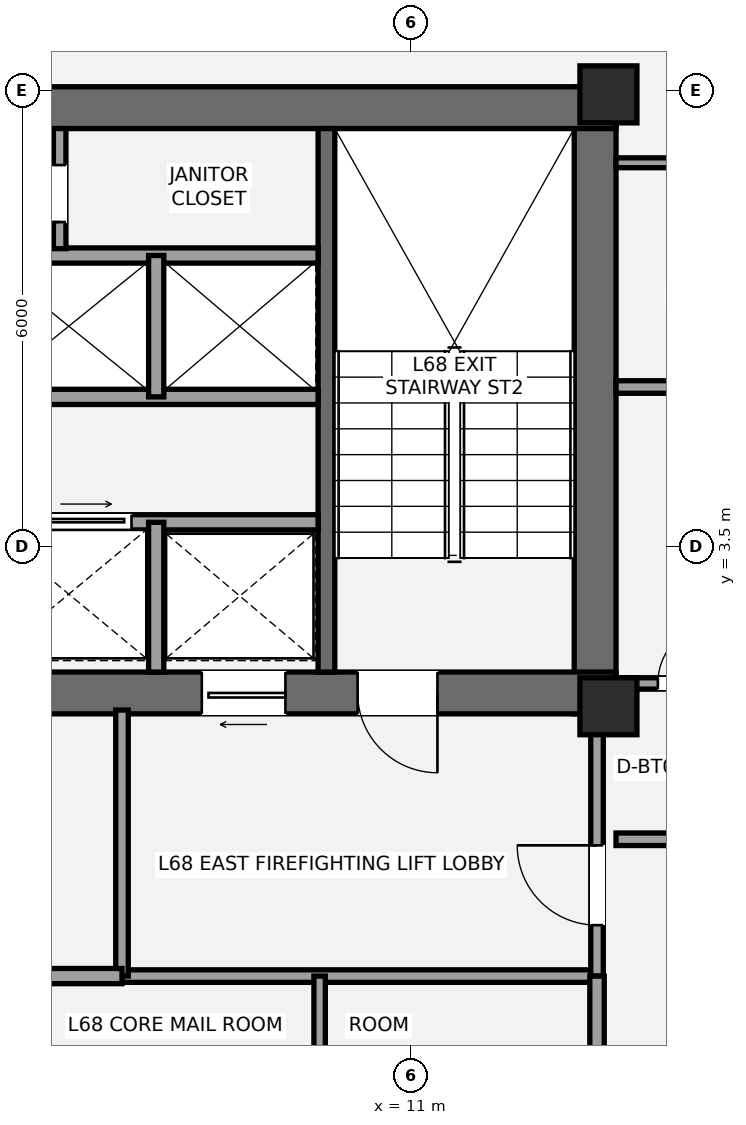
"""IFC4 building model, lengths in metres.
Left out: names, types, materials, properties, quantities, classifications, styles, units other than length and angle.
Written with IfcOpenShell. Run it as: python <this file> out.ifc"""

import sys

from ifc_helpers import new_model, si_unit, direction, frame, frame_2d, origin, origin_2d, place, context, subcontext, project, spatial, rectangle, extrude, element, fill, save


model = new_model("IFC4")
c1 = context("Model", 3, precision=1e-05, world=origin(), true_north=direction((0.0, 1.0)))
c2 = subcontext(c1, "Body", "Model", "MODEL_VIEW")
j1 = project(units=[si_unit("LENGTHUNIT", "METRE"), si_unit("PLANEANGLEUNIT", "RADIAN")], contexts=[c1])
p1 = place(None, origin())
s1 = spatial("IfcSite", under=j1, at=p1, CompositionType="ELEMENT")
p2 = place(p1, origin())
s2 = spatial("IfcBuilding", under=s1, at=p2, CompositionType="ELEMENT")
p3 = place(p2, frame((0.0, 0.0, 241.5)))
s3 = spatial("IfcBuildingStorey", under=s2, at=p3, CompositionType="ELEMENT", Elevation=241.5)
p4 = place(p3, frame((13.425, 1.3, 0.0), z_axis=(0.0, 0.0, 1.0), x_axis=(0.0, 1.0, 0.0)))
e1 = element("IfcWall", 1, at=p4, inside=s3, PredefinedType="SHEAR", context=c2, shape_type="SweptSolid", body=[
    extrude(rectangle(XDim=8.25, YDim=0.55, at=frame_2d((4.125, 0.0))), origin(), (0.0, 0.0, 1.0), 3.15),
])
p5 = place(p3, frame((4.525, 9.275, 0.0), z_axis=(0.0, 0.0, 1.0), x_axis=(1.0, 0.0, 0.0)))
e2 = element("IfcWall", 2, at=p5, inside=s3, PredefinedType="SHEAR", context=c2, shape_type="SweptSolid", body=[
    extrude(rectangle(XDim=9.175, YDim=0.55, at=frame_2d((4.587, 0.0))), origin(), (0.0, 0.0, 1.0), 3.15),
])
p6 = place(p3, frame((13.7, 1.575, 0.0), z_axis=(0.0, 0.0, 1.0), x_axis=(-1.0, 0.0, 0.0)))
e3 = element("IfcWall", 3, at=p6, inside=s3, PredefinedType="SHEAR", context=c2, shape_type="SweptSolid", body=[
    extrude(rectangle(XDim=8.775, YDim=0.55, at=frame_2d((4.387, 0.0))), origin(), (0.0, 0.0, 1.0), 3.15),
])
p7 = place(p6, frame((2.35, 0.0, 0.0)))
e4 = element("IfcOpeningElement", 4, at=p7, cuts=e3, PredefinedType="OPENING", context=c2, shape_type="SweptSolid", body=[
    extrude(rectangle(XDim=1.05, YDim=2.15, at=frame_2d((0.525, 1.075))), frame((0.0, 0.285, 0.0), z_axis=(0.0, -1.0, 0.0), x_axis=(1.0, 0.0, 0.0)), (0.0, 0.0, 1.0), 0.57),
])
p8 = place(p6, frame((4.35, 0.0, 0.0)))
e5 = element("IfcOpeningElement", 5, at=p8, cuts=e3, PredefinedType="OPENING", context=c2, shape_type="SweptSolid", body=[
    extrude(rectangle(XDim=1.1, YDim=2.2, at=frame_2d((0.55, 1.1))), frame((0.0, 0.285, 0.0), z_axis=(0.0, -1.0, 0.0), x_axis=(1.0, 0.0, 0.0)), (0.0, 0.0, 1.0), 0.57),
])
p9 = place(p3, frame((9.89, 1.85, 0.0), z_axis=(0.0, 0.0, 1.0), x_axis=(0.0, 1.0, 0.0)))
e6 = element("IfcWall", 6, at=p9, inside=s3, PredefinedType="SHEAR", context=c2, shape_type="SweptSolid", body=[
    extrude(rectangle(XDim=7.15, YDim=0.22, at=frame_2d((3.575, 0.0))), origin(), (0.0, 0.0, 1.0), 3.15),
])
for number, where, z_axis, x_axis in (
    (7, (13.6, 1.4, 0.0), (0.0, 0.0, 1.0), (1.0, 0.0, 0.0)),
    (8, (13.6, 9.45, 0.0), (0.0, 0.0, 1.0), (1.0, 0.0, 0.0)),
):
    element("IfcColumn", number, at=place(p3, frame(where, z_axis=z_axis, x_axis=x_axis)), inside=s3, PredefinedType="PILASTER", context=c2, shape_type="SweptSolid", body=[
        extrude(rectangle(XDim=0.75, YDim=0.75, at=origin_2d()), origin(), (0.0, 0.0, 1.0), 3.15),
    ])
p10 = place(p3, frame((14.242, 11.688, 0.0), z_axis=(0.0, 0.0, 1.0), x_axis=(0.827637036896, -0.561263694851, 0.0)))
e9 = element("IfcWall", 9, at=p10, inside=s3, PredefinedType="STANDARD", context=c2, shape_type="SweptSolid", body=[
    extrude(rectangle(XDim=3.793, YDim=0.44, at=frame_2d((1.896, 0.0))), origin(), (0.0, 0.0, 1.0), 2.336),
])
p11 = place(p10, frame((0.598, 0.0, 0.55)))
e10 = element("IfcOpeningElement", 10, at=p11, cuts=e9, PredefinedType="OPENING", context=c2, shape_type="SweptSolid", body=[
    extrude(rectangle(XDim=1.75, YDim=1.55, at=frame_2d((0.875, 0.775))), frame((0.0, 0.23, 0.0), z_axis=(0.0, -1.0, 0.0), x_axis=(1.0, 0.0, 0.0)), (0.0, 0.0, 1.0), 0.46),
])
p12 = place(p3, frame((7.2, -2.15, 0.0), z_axis=(0.0, 0.0, 1.0), x_axis=(1.0, 0.0, 0.0)))
e11 = element("IfcWall", 11, at=p12, inside=s3, PredefinedType="PARTITIONING", context=c2, shape_type="SweptSolid", body=[
    extrude(rectangle(XDim=6.25, YDim=0.165, at=frame_2d((3.125, 0.0))), origin(), (0.0, 0.0, 1.0), 2.97),
])
p13 = place(p3, frame((7.2, -2.15, 0.0), z_axis=(0.0, 0.0, 1.0), x_axis=(0.0, 1.0, 0.0)))
e12 = element("IfcWall", 12, at=p13, inside=s3, PredefinedType="PARTITIONING", context=c2, shape_type="SweptSolid", body=[
    extrude(rectangle(XDim=3.5, YDim=0.165, at=frame_2d((1.75, 0.0))), origin(), (0.0, 0.0, 1.0), 2.423),
])
p14 = place(p3, frame((13.45, -2.15, 0.0), z_axis=(0.0, 0.0, 1.0), x_axis=(0.0, 1.0, 0.0)))
e13 = element("IfcWall", 13, at=p14, inside=s3, PredefinedType="PARTITIONING", context=c2, shape_type="SweptSolid", body=[
    extrude(rectangle(XDim=3.5, YDim=0.165, at=frame_2d((1.75, 0.0))), origin(), (0.0, 0.0, 1.0), 2.423),
])
p15 = place(p14, frame((0.67, 0.0, 0.0)))
e14 = element("IfcOpeningElement", 14, at=p15, cuts=e13, PredefinedType="OPENING", context=c2, shape_type="SweptSolid", body=[
    extrude(rectangle(XDim=1.05, YDim=2.15, at=frame_2d((0.525, 1.075))), frame((0.0, 0.093, 0.0), z_axis=(0.0, -1.0, 0.0), x_axis=(1.0, 0.0, 0.0)), (0.0, 0.0, 1.0), 0.185),
])
p16 = place(p3, frame((4.95, -2.15, 0.0), z_axis=(0.0, 0.0, 1.0), x_axis=(1.0, 0.0, 0.0)))
e15 = element("IfcWall", 15, at=p16, inside=s3, PredefinedType="SOLIDWALL", context=c2, shape_type="SweptSolid", body=[
    extrude(rectangle(XDim=2.25, YDim=0.2, at=frame_2d((1.125, 0.0))), origin(), (0.0, 0.0, 1.0), 2.97),
])
p17 = place(p3, frame((5.475, 3.82, 0.0), z_axis=(0.0, 0.0, 1.0), x_axis=(1.0, 0.0, 0.0)))
e16 = element("IfcWall", 16, at=p17, inside=s3, PredefinedType="SOLIDWALL", context=c2, shape_type="SweptSolid", body=[
    extrude(rectangle(XDim=4.305, YDim=0.2, at=frame_2d((2.152, 0.0))), origin(), (0.0, 0.0, 1.0), 2.97),
])
p18 = place(p17, frame((0.65, 0.0, 0.0)))
e17 = element("IfcOpeningElement", 17, at=p18, cuts=e16, PredefinedType="OPENING", context=c2, shape_type="SweptSolid", body=[
    extrude(rectangle(XDim=1.2, YDim=2.2, at=frame_2d((0.6, 1.1))), frame((0.0, 0.11, 0.0), z_axis=(0.0, -1.0, 0.0), x_axis=(1.0, 0.0, 0.0)), (0.0, 0.0, 1.0), 0.22),
])
p19 = place(p3, frame((7.65, 1.85, 0.0), z_axis=(0.0, 0.0, 1.0), x_axis=(0.0, 1.0, 0.0)))
e18 = element("IfcWall", 18, at=p19, inside=s3, PredefinedType="SOLIDWALL", context=c2, shape_type="SweptSolid", body=[
    extrude(rectangle(XDim=1.97, YDim=0.2, at=frame_2d((0.985, 0.0))), origin(), (0.0, 0.0, 1.0), 2.97),
])
for number, where, z_axis, x_axis in (
    (19, (5.475, 5.47, 0.0), (0.0, 0.0, 1.0), (1.0, 0.0, 0.0)),
    (20, (5.475, 7.33, 0.0), (0.0, 0.0, 1.0), (1.0, 0.0, 0.0)),
):
    element("IfcWall", number, at=place(p3, frame(where, z_axis=z_axis, x_axis=x_axis)), inside=s3, PredefinedType="SOLIDWALL", context=c2, shape_type="SweptSolid", body=[
        extrude(rectangle(XDim=4.305, YDim=0.2, at=frame_2d((2.152, 0.0))), origin(), (0.0, 0.0, 1.0), 2.97),
    ])
p20 = place(p3, frame((7.65, 5.47, 0.0), z_axis=(0.0, 0.0, 1.0), x_axis=(0.0, 1.0, 0.0)))
e21 = element("IfcWall", 21, at=p20, inside=s3, PredefinedType="SOLIDWALL", context=c2, shape_type="SweptSolid", body=[
    extrude(rectangle(XDim=1.86, YDim=0.2, at=frame_2d((0.93, 0.0))), origin(), (0.0, 0.0, 1.0), 2.97),
])
p21 = place(p3, frame((6.38, 7.42, 0.0), z_axis=(0.0, 0.0, 1.0), x_axis=(0.0, 1.0, 0.0)))
e22 = element("IfcWall", 22, at=p21, inside=s3, PredefinedType="PARTITIONING", context=c2, shape_type="SweptSolid", body=[
    extrude(rectangle(XDim=1.58, YDim=0.165, at=frame_2d((0.79, 0.0))), origin(), (0.0, 0.0, 1.0), 2.97),
])
p22 = place(p21, frame((0.35, 0.0, 0.0)))
e23 = element("IfcOpeningElement", 23, at=p22, cuts=e22, PredefinedType="OPENING", context=c2, shape_type="SweptSolid", body=[
    extrude(rectangle(XDim=0.75, YDim=2.1, at=frame_2d((0.375, 1.05))), frame((0.0, 0.093, 0.0), z_axis=(0.0, -1.0, 0.0), x_axis=(1.0, 0.0, 0.0)), (0.0, 0.0, 1.0), 0.185),
])
p23 = place(p3, frame((13.45, -4.05, 0.0), z_axis=(0.0, 0.0, 1.0), x_axis=(0.0, 1.0, 0.0)))
e24 = element("IfcWall", 24, at=p23, inside=s3, PredefinedType="PLUMBINGWALL", context=c2, shape_type="SweptSolid", body=[
    extrude(rectangle(XDim=1.9, YDim=0.19, at=frame_2d((0.95, 0.0))), origin(), (0.0, 0.0, 1.0), 2.423),
])
p24 = place(p3, frame((9.8, -4.05, 0.0), z_axis=(0.0, 0.0, 1.0), x_axis=(0.0, 1.0, 0.0)))
e25 = element("IfcWall", 25, at=p24, inside=s3, PredefinedType="PLUMBINGWALL", context=c2, shape_type="SweptSolid", body=[
    extrude(rectangle(XDim=1.9, YDim=0.15, at=frame_2d((0.95, 0.0))), origin(), (0.0, 0.0, 1.0), 2.97),
])
p25 = place(p3, frame((13.7, -0.35, 0.0), z_axis=(0.0, 0.0, 1.0), x_axis=(1.0, 0.0, 0.0)))
e26 = element("IfcWall", 26, at=p25, inside=s3, PredefinedType="PARTITIONING", context=c2, shape_type="SweptSolid", body=[
    extrude(rectangle(XDim=2.15, YDim=0.165, at=frame_2d((1.075, 0.0))), origin(), (0.0, 0.0, 1.0), 2.423),
])
p26 = place(p3, frame((13.7, 5.6, 0.0), z_axis=(0.0, 0.0, 1.0), x_axis=(1.0, 0.0, 0.0)))
e27 = element("IfcWall", 27, at=p26, inside=s3, PredefinedType="PARTITIONING", context=c2, shape_type="SweptSolid", body=[
    extrude(rectangle(XDim=6.36, YDim=0.165, at=frame_2d((3.18, 0.0))), origin(), (0.0, 0.0, 1.0), 2.423),
])
p27 = place(p26, frame((3.151, 0.0, 0.0)))
e28 = element("IfcOpeningElement", 28, at=p27, cuts=e27, PredefinedType="OPENING", context=c2, shape_type="SweptSolid", body=[
    extrude(rectangle(XDim=0.85, YDim=2.1, at=frame_2d((0.425, 1.05))), frame((0.0, 0.093, 0.0), z_axis=(0.0, -1.0, 0.0), x_axis=(1.0, 0.0, 0.0)), (0.0, 0.0, 1.0), 0.185),
])
p28 = place(p3, frame((13.7, 1.7, 0.0), z_axis=(0.0, 0.0, 1.0), x_axis=(1.0, 0.0, 0.0)))
e29 = element("IfcWall", 29, at=p28, inside=s3, PredefinedType="PLUMBINGWALL", context=c2, shape_type="SweptSolid", body=[
    extrude(rectangle(XDim=4.25, YDim=0.15, at=frame_2d((2.125, 0.0))), origin(), (0.0, 0.0, 1.0), 2.423),
])
p29 = place(p28, frame((0.55, 0.0, 0.0)))
e30 = element("IfcOpeningElement", 30, at=p29, cuts=e29, PredefinedType="OPENING", context=c2, shape_type="SweptSolid", body=[
    extrude(rectangle(XDim=0.8, YDim=2.1, at=frame_2d((0.4, 1.05))), frame((0.0, 0.085, 0.0), z_axis=(0.0, -1.0, 0.0), x_axis=(1.0, 0.0, 0.0)), (0.0, 0.0, 1.0), 0.17),
])
p30 = place(p28, frame((2.15, 0.0, 0.0)))
e31 = element("IfcOpeningElement", 31, at=p30, cuts=e29, PredefinedType="OPENING", context=c2, shape_type="SweptSolid", body=[
    extrude(rectangle(XDim=0.85, YDim=2.1, at=frame_2d((0.425, 1.05))), frame((0.0, 0.085, 0.0), z_axis=(0.0, -1.0, 0.0), x_axis=(1.0, 0.0, 0.0)), (0.0, 0.0, 1.0), 0.17),
])
p31 = place(p3, frame((13.7, 8.55, 0.0), z_axis=(0.0, 0.0, 1.0), x_axis=(1.0, 0.0, 0.0)))
e32 = element("IfcWall", 32, at=p31, inside=s3, PredefinedType="PARTITIONING", context=c2, shape_type="SweptSolid", body=[
    extrude(rectangle(XDim=4.258, YDim=0.13, at=frame_2d((2.129, 0.0))), origin(), (0.0, 0.0, 1.0), 2.423),
])
p32 = place(p31, frame((2.176, 0.0, 0.0)))
e33 = element("IfcOpeningElement", 33, at=p32, cuts=e32, PredefinedType="OPENING", context=c2, shape_type="SweptSolid", body=[
    extrude(rectangle(XDim=0.85, YDim=2.1, at=frame_2d((0.425, 1.05))), frame((0.0, 0.075, 0.0), z_axis=(0.0, -1.0, 0.0), x_axis=(1.0, 0.0, 0.0)), (0.0, 0.0, 1.0), 0.15),
])
p33 = place(p7, origin())
e34 = element("IfcDoor", 34, at=p33, inside=s3, OperationType="SINGLE_SWING_LEFT", PredefinedType="DOOR", context=c2, shape_type="SweptSolid", body=[
    extrude(rectangle(XDim=1.05, YDim=2.15, at=frame_2d((0.525, 1.075))), frame((0.0, 0.025, 0.0), z_axis=(0.0, -1.0, 0.0), x_axis=(1.0, 0.0, 0.0)), (0.0, 0.0, 1.0), 0.05),
])
fill(e4, e34)
p34 = place(p15, origin())
e35 = element("IfcDoor", 35, at=p34, inside=s3, OperationType="SINGLE_SWING_RIGHT", PredefinedType="DOOR", context=c2, shape_type="SweptSolid", body=[
    extrude(rectangle(XDim=1.05, YDim=2.15, at=frame_2d((0.525, 1.075))), frame((0.0, 0.025, 0.0), z_axis=(0.0, -1.0, 0.0), x_axis=(1.0, 0.0, 0.0)), (0.0, 0.0, 1.0), 0.05),
])
fill(e14, e35)
p35 = place(p8, origin())
e36 = element("IfcDoor", 36, at=p35, inside=s3, OperationType="SLIDING_TO_LEFT", PredefinedType="DOOR", context=c2, shape_type="SweptSolid", body=[
    extrude(rectangle(XDim=1.1, YDim=2.2, at=frame_2d((0.55, 1.1))), frame((0.0, 0.025, 0.0), z_axis=(0.0, -1.0, 0.0), x_axis=(1.0, 0.0, 0.0)), (0.0, 0.0, 1.0), 0.05),
])
fill(e5, e36)
p36 = place(p18, origin())
e37 = element("IfcDoor", 37, at=p36, inside=s3, OperationType="SLIDING_TO_RIGHT", PredefinedType="DOOR", context=c2, shape_type="SweptSolid", body=[
    extrude(rectangle(XDim=1.2, YDim=2.2, at=frame_2d((0.6, 1.1))), frame((0.0, 0.025, 0.0), z_axis=(0.0, -1.0, 0.0), x_axis=(1.0, 0.0, 0.0)), (0.0, 0.0, 1.0), 0.05),
])
fill(e17, e37)
p37 = place(p22, origin())
e38 = element("IfcDoor", 38, at=p37, inside=s3, OperationType="SINGLE_SWING_LEFT", PredefinedType="DOOR", context=c2, shape_type="SweptSolid", body=[
    extrude(rectangle(XDim=0.75, YDim=2.1, at=frame_2d((0.375, 1.05))), frame((0.0, 0.025, 0.0), z_axis=(0.0, -1.0, 0.0), x_axis=(1.0, 0.0, 0.0)), (0.0, 0.0, 1.0), 0.05),
])
fill(e23, e38)
p38 = place(p29, origin())
e39 = element("IfcDoor", 39, at=p38, inside=s3, OperationType="SINGLE_SWING_RIGHT", PredefinedType="DOOR", context=c2, shape_type="SweptSolid", body=[
    extrude(rectangle(XDim=0.8, YDim=2.1, at=frame_2d((0.4, 1.05))), frame((0.0, 0.025, 0.0), z_axis=(0.0, -1.0, 0.0), x_axis=(1.0, 0.0, 0.0)), (0.0, 0.0, 1.0), 0.05),
])
fill(e30, e39)
save(model, sys.argv[1])
